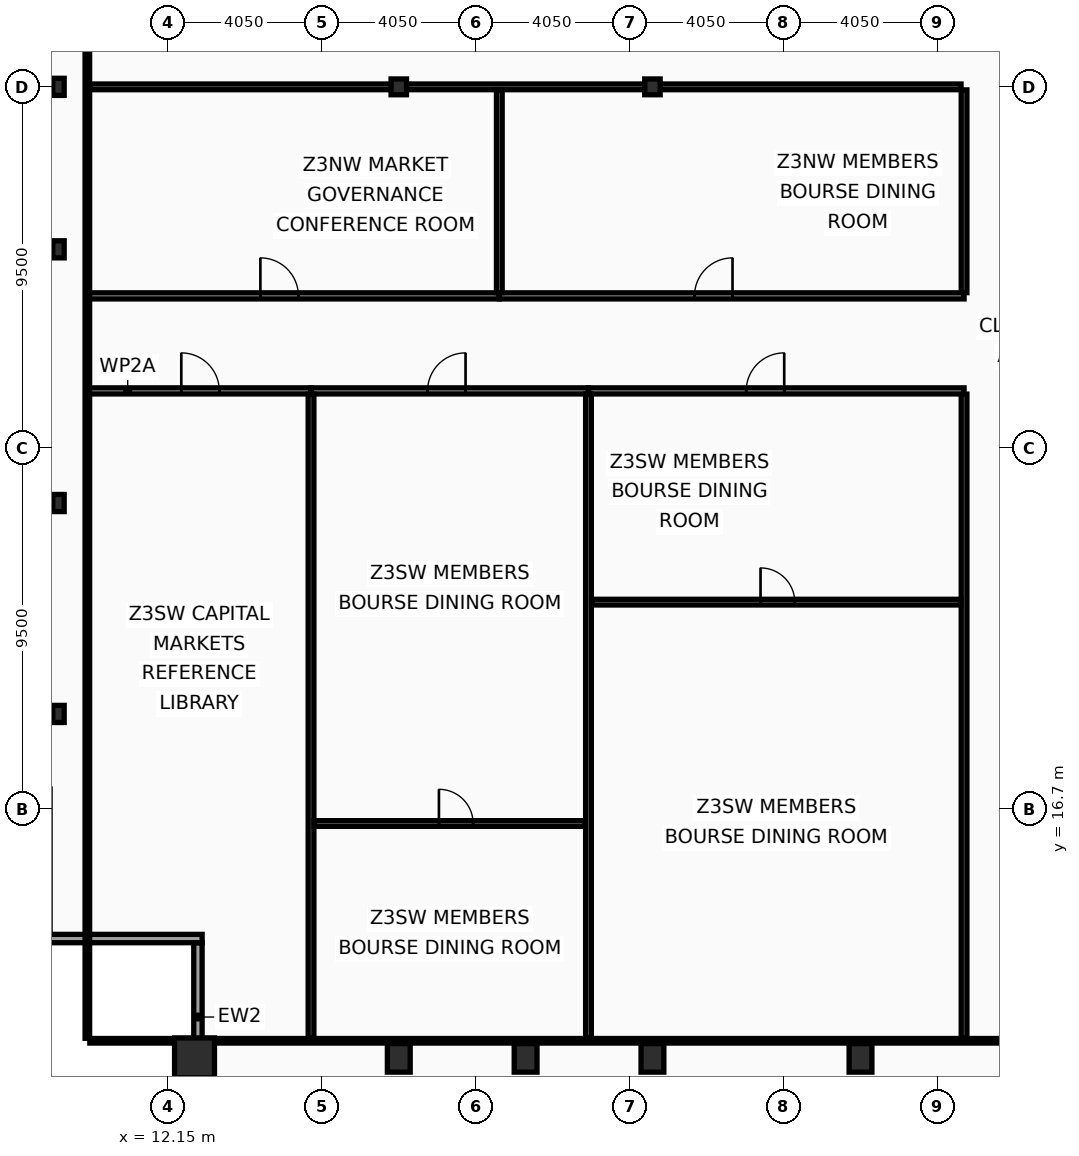
"""IFC4 building model, lengths in metres.
Left out: names, types, materials, properties, quantities, classifications, styles, units other than length and angle.
Written with IfcOpenShell. Run it as: python <this file> out.ifc"""

import sys

from ifc_helpers import new_model, si_unit, direction, frame, frame_2d, origin, origin_2d, place, context, subcontext, project, spatial, rectangle, hollow_rectangle, i_section, extrude, element, fill, save


model = new_model("IFC4")
c1 = context("Model", 3, precision=1e-05, world=origin(), true_north=direction((0.0, 1.0)))
c2 = subcontext(c1, "Body", "Model", "MODEL_VIEW")
j1 = project(units=[si_unit("LENGTHUNIT", "METRE"), si_unit("PLANEANGLEUNIT", "RADIAN")], contexts=[c1])
p1 = place(None, origin())
s1 = spatial("IfcSite", under=j1, at=p1, CompositionType="ELEMENT")
p2 = place(p1, origin())
s2 = spatial("IfcBuilding", under=s1, at=p2, CompositionType="ELEMENT")
p3 = place(p2, frame((0.0, 0.0, 246.2)))
s3 = spatial("IfcBuildingStorey", under=s2, at=p3, CompositionType="ELEMENT", Elevation=246.2)
p4 = place(p3, frame((12.85, 10.15, 0.0), z_axis=(0.0, 0.0, 1.0), x_axis=(1.0, 0.0, 0.0)))
e1 = element("IfcColumn", 1, at=p4, inside=s3, PredefinedType="COLUMN", context=c2, shape_type="SweptSolid", body=[
    extrude(hollow_rectangle(XDim=1.05, YDim=1.05, WallThickness=0.055, at=origin_2d()), origin(), (0.0, 0.0, 1.0), 3.6),
])
for number, where, z_axis, x_axis in (
    (2, (18.225, 10.15, 0.0), (0.0, 0.0, 1.0), (1.0, 0.0, 0.0)),
    (3, (21.562, 10.15, 0.0), (0.0, 0.0, 1.0), (1.0, 0.0, 0.0)),
    (4, (24.9, 10.15, 0.0), (0.0, 0.0, 1.0), (1.0, 0.0, 0.0)),
    (5, (30.375, 10.15, 0.0), (0.0, 0.0, 1.0), (1.0, 0.0, 0.0)),
):
    element("IfcColumn", number, at=place(p3, frame(where, z_axis=z_axis, x_axis=x_axis)), inside=s3, PredefinedType="COLUMN", context=c2, shape_type="SweptSolid", body=[
        extrude(hollow_rectangle(XDim=0.6, YDim=0.75, WallThickness=0.045, at=origin_2d()), origin(), (0.0, 0.0, 1.0), 3.6),
    ])
for number, where, z_axis, x_axis in (
    (6, (9.27, 19.2, 0.0), (0.0, 0.0, 1.0), (1.0, 0.0, 0.0)),
    (7, (9.27, 24.75, 0.0), (0.0, 0.0, 1.0), (1.0, 0.0, 0.0)),
    (8, (9.27, 31.425, 0.0), (0.0, 0.0, 1.0), (1.0, 0.0, 0.0)),
    (9, (9.27, 35.7, 0.0), (0.0, 0.0, 1.0), (1.0, 0.0, 0.0)),
):
    element("IfcColumn", number, at=place(p3, frame(where, z_axis=z_axis, x_axis=x_axis)), inside=s3, PredefinedType="COLUMN", context=c2, shape_type="SweptSolid", body=[
        extrude(i_section(OverallWidth=0.3, OverallDepth=0.45, WebThickness=0.014, FlangeThickness=0.026, at=origin_2d()), origin(), (0.0, 0.0, 1.0), 3.6),
    ])
for number, where, z_axis, x_axis in (
    (10, (18.225, 35.7, 0.0), (0.0, 0.0, 1.0), (1.0, 0.0, 0.0)),
    (11, (24.9, 35.7, 0.0), (0.0, 0.0, 1.0), (1.0, 0.0, 0.0)),
):
    element("IfcColumn", number, at=place(p3, frame(where, z_axis=z_axis, x_axis=x_axis)), inside=s3, PredefinedType="COLUMN", context=c2, shape_type="SweptSolid", body=[
        extrude(i_section(OverallWidth=0.406, OverallDepth=0.416, WebThickness=0.03, FlangeThickness=0.048, at=origin_2d()), origin(), (0.0, 0.0, 1.0), 3.6),
    ])
p5 = place(p3, frame((12.94, 9.27, 0.0), z_axis=(0.0, 0.0, 1.0), x_axis=(0.0, 1.0, 0.0)))
e12 = element("IfcWall", 12, at=p5, inside=s3, PredefinedType="SOLIDWALL", context=c2, shape_type="SweptSolid", body=[
    extrude(rectangle(XDim=3.91, YDim=0.22, at=frame_2d((1.955, 0.0))), origin(), (0.0, 0.0, 1.0), 2.83),
])
p6 = place(p3, frame((13.05, 13.29, 0.0), z_axis=(0.0, 0.0, 1.0), x_axis=(-1.0, 0.0, 0.0)))
e13 = element("IfcWall", 13, at=p6, inside=s3, PredefinedType="SOLIDWALL", context=c2, shape_type="SweptSolid", body=[
    extrude(rectangle(XDim=4.22, YDim=0.22, at=frame_2d((2.11, 0.0))), origin(), (0.0, 0.0, 1.0), 2.83),
])
p7 = place(p3, frame((33.1, 10.665, 0.0), z_axis=(0.0, 0.0, 1.0), x_axis=(0.0, 1.0, 0.0)))
e14 = element("IfcWall", 14, at=p7, inside=s3, PredefinedType="PARTITIONING", context=c2, shape_type="SweptSolid", body=[
    extrude(rectangle(XDim=16.95, YDim=0.15, at=frame_2d((8.475, 0.0))), origin(), (0.0, 0.0, 1.0), 2.98),
])
p8 = place(p3, frame((33.1, 30.285, 0.0), z_axis=(0.0, 0.0, 1.0), x_axis=(0.0, 1.0, 0.0)))
e15 = element("IfcWall", 15, at=p8, inside=s3, PredefinedType="PARTITIONING", context=c2, shape_type="SweptSolid", body=[
    extrude(rectangle(XDim=5.335, YDim=0.15, at=frame_2d((2.667, 0.0))), origin(), (0.0, 0.0, 1.0), 2.98),
])
p9 = place(p3, frame((10.095, 35.7, 0.0), z_axis=(0.0, 0.0, 1.0), x_axis=(1.0, 0.0, 0.0)))
e16 = element("IfcWall", 16, at=p9, inside=s3, PredefinedType="PARTITIONING", context=c2, shape_type="SweptSolid", body=[
    extrude(rectangle(XDim=22.925, YDim=0.15, at=frame_2d((11.462, 0.0))), origin(), (0.0, 0.0, 1.0), 2.78),
])
p10 = place(p3, frame((10.03, 27.7, 0.0), z_axis=(0.0, 0.0, 1.0), x_axis=(1.0, 0.0, 0.0)))
e17 = element("IfcWall", 17, at=p10, inside=s3, PredefinedType="PARTITIONING", context=c2, shape_type="SweptSolid", body=[
    extrude(rectangle(XDim=5.886, YDim=0.16, at=frame_2d((2.943, 0.0))), origin(), (0.0, 0.0, 1.0), 3.44),
])
p11 = place(p10, frame((2.472, 0.0, 0.0)))
e18 = element("IfcOpeningElement", 18, at=p11, cuts=e17, PredefinedType="OPENING", context=c2, shape_type="SweptSolid", body=[
    extrude(rectangle(XDim=1.0, YDim=2.05, at=frame_2d((0.5, 1.025))), frame((0.0, 0.09, 0.0), z_axis=(0.0, -1.0, 0.0), x_axis=(1.0, 0.0, 0.0)), (0.0, 0.0, 1.0), 0.18),
])
p12 = place(p3, frame((15.916, 27.7, 0.0), z_axis=(0.0, 0.0, 1.0), x_axis=(1.0, 0.0, 0.0)))
e19 = element("IfcWall", 19, at=p12, inside=s3, PredefinedType="PARTITIONING", context=c2, shape_type="SweptSolid", body=[
    extrude(rectangle(XDim=7.301, YDim=0.16, at=frame_2d((3.65, 0.0))), origin(), (0.0, 0.0, 1.0), 2.78),
])
p13 = place(p12, frame((3.066, 0.0, 0.0)))
e20 = element("IfcOpeningElement", 20, at=p13, cuts=e19, PredefinedType="OPENING", context=c2, shape_type="SweptSolid", body=[
    extrude(rectangle(XDim=1.0, YDim=2.05, at=frame_2d((0.5, 1.025))), frame((0.0, 0.09, 0.0), z_axis=(0.0, -1.0, 0.0), x_axis=(1.0, 0.0, 0.0)), (0.0, 0.0, 1.0), 0.18),
])
p14 = place(p3, frame((15.916, 10.665, 0.0), z_axis=(0.0, 0.0, 1.0), x_axis=(0.0, 1.0, 0.0)))
e21 = element("IfcWall", 21, at=p14, inside=s3, PredefinedType="PARTITIONING", context=c2, shape_type="SweptSolid", body=[
    extrude(rectangle(XDim=16.95, YDim=0.15, at=frame_2d((8.475, 0.0))), origin(), (0.0, 0.0, 1.0), 2.78),
])
p15 = place(p3, frame((15.996, 16.317, 0.0), z_axis=(0.0, 0.0, 1.0), x_axis=(1.0, 0.0, 0.0)))
e22 = element("IfcWall", 22, at=p15, inside=s3, PredefinedType="PARTITIONING", context=c2, shape_type="SweptSolid", body=[
    extrude(rectangle(XDim=7.141, YDim=0.15, at=frame_2d((3.57, 0.0))), origin(), (0.0, 0.0, 1.0), 2.78),
])
p16 = place(p15, frame((3.285, 0.0, 0.0)))
e23 = element("IfcOpeningElement", 23, at=p16, cuts=e22, PredefinedType="OPENING", context=c2, shape_type="SweptSolid", body=[
    extrude(rectangle(XDim=0.9, YDim=2.05, at=frame_2d((0.45, 1.025))), frame((0.0, 0.085, 0.0), z_axis=(0.0, -1.0, 0.0), x_axis=(1.0, 0.0, 0.0)), (0.0, 0.0, 1.0), 0.17),
])
p17 = place(p3, frame((23.217, 27.7, 0.0), z_axis=(0.0, 0.0, 1.0), x_axis=(1.0, 0.0, 0.0)))
e24 = element("IfcWall", 24, at=p17, inside=s3, PredefinedType="PARTITIONING", context=c2, shape_type="SweptSolid", body=[
    extrude(rectangle(XDim=9.883, YDim=0.16, at=frame_2d((4.942, 0.0))), origin(), (0.0, 0.0, 1.0), 2.78),
])
p18 = place(p17, frame((4.151, 0.0, 0.0)))
e25 = element("IfcOpeningElement", 25, at=p18, cuts=e24, PredefinedType="OPENING", context=c2, shape_type="SweptSolid", body=[
    extrude(rectangle(XDim=1.0, YDim=2.05, at=frame_2d((0.5, 1.025))), frame((0.0, 0.09, 0.0), z_axis=(0.0, -1.0, 0.0), x_axis=(1.0, 0.0, 0.0)), (0.0, 0.0, 1.0), 0.18),
])
p19 = place(p3, frame((23.217, 10.665, 0.0), z_axis=(0.0, 0.0, 1.0), x_axis=(0.0, 1.0, 0.0)))
e26 = element("IfcWall", 26, at=p19, inside=s3, PredefinedType="PARTITIONING", context=c2, shape_type="SweptSolid", body=[
    extrude(rectangle(XDim=16.95, YDim=0.15, at=frame_2d((8.475, 0.0))), origin(), (0.0, 0.0, 1.0), 2.98),
])
p20 = place(p3, frame((23.297, 22.142, 0.0), z_axis=(0.0, 0.0, 1.0), x_axis=(1.0, 0.0, 0.0)))
e27 = element("IfcWall", 27, at=p20, inside=s3, PredefinedType="PARTITIONING", context=c2, shape_type="SweptSolid", body=[
    extrude(rectangle(XDim=9.723, YDim=0.15, at=frame_2d((4.862, 0.0))), origin(), (0.0, 0.0, 1.0), 2.78),
])
p21 = place(p20, frame((4.448, 0.0, 0.0)))
e28 = element("IfcOpeningElement", 28, at=p21, cuts=e27, PredefinedType="OPENING", context=c2, shape_type="SweptSolid", body=[
    extrude(rectangle(XDim=0.9, YDim=2.05, at=frame_2d((0.45, 1.025))), frame((0.0, 0.085, 0.0), z_axis=(0.0, -1.0, 0.0), x_axis=(1.0, 0.0, 0.0)), (0.0, 0.0, 1.0), 0.17),
])
p22 = place(p3, frame((10.03, 30.2, 0.0), z_axis=(0.0, 0.0, 1.0), x_axis=(1.0, 0.0, 0.0)))
e29 = element("IfcWall", 29, at=p22, inside=s3, PredefinedType="PARTITIONING", context=c2, shape_type="SweptSolid", body=[
    extrude(rectangle(XDim=10.841, YDim=0.16, at=frame_2d((5.42, 0.0))), origin(), (0.0, 0.0, 1.0), 2.78),
])
p23 = place(p22, frame((4.553, 0.0, 0.0)))
e30 = element("IfcOpeningElement", 30, at=p23, cuts=e29, PredefinedType="OPENING", context=c2, shape_type="SweptSolid", body=[
    extrude(rectangle(XDim=1.0, YDim=2.05, at=frame_2d((0.5, 1.025))), frame((0.0, 0.09, 0.0), z_axis=(0.0, -1.0, 0.0), x_axis=(1.0, 0.0, 0.0)), (0.0, 0.0, 1.0), 0.18),
])
p24 = place(p3, frame((20.871, 30.2, 0.0), z_axis=(0.0, 0.0, 1.0), x_axis=(1.0, 0.0, 0.0)))
e31 = element("IfcWall", 31, at=p24, inside=s3, PredefinedType="PARTITIONING", context=c2, shape_type="SweptSolid", body=[
    extrude(rectangle(XDim=12.229, YDim=0.16, at=frame_2d((6.115, 0.0))), origin(), (0.0, 0.0, 1.0), 2.78),
])
p25 = place(p24, frame((5.136, 0.0, 0.0)))
e32 = element("IfcOpeningElement", 32, at=p25, cuts=e31, PredefinedType="OPENING", context=c2, shape_type="SweptSolid", body=[
    extrude(rectangle(XDim=1.0, YDim=2.05, at=frame_2d((0.5, 1.025))), frame((0.0, 0.09, 0.0), z_axis=(0.0, -1.0, 0.0), x_axis=(1.0, 0.0, 0.0)), (0.0, 0.0, 1.0), 0.18),
])
p26 = place(p3, frame((20.871, 30.285, 0.0), z_axis=(0.0, 0.0, 1.0), x_axis=(0.0, 1.0, 0.0)))
e33 = element("IfcWall", 33, at=p26, inside=s3, PredefinedType="PARTITIONING", context=c2, shape_type="SweptSolid", body=[
    extrude(rectangle(XDim=5.335, YDim=0.15, at=frame_2d((2.667, 0.0))), origin(), (0.0, 0.0, 1.0), 2.98),
])
p27 = place(p3, frame((10.03, 10.665, 0.0), z_axis=(0.0, 0.0, 1.0), x_axis=(0.0, 1.0, 0.0)))
e34 = element("IfcWall", 34, at=p27, inside=s3, PredefinedType="PARTITIONING", context=c2, shape_type="SweptSolid", body=[
    extrude(rectangle(XDim=42.11, YDim=0.12, at=frame_2d((21.055, 0.0))), origin(), (0.0, 0.0, 1.0), 2.78),
])
p28 = place(p3, frame((10.095, 10.6, 0.0), z_axis=(0.0, 0.0, 1.0), x_axis=(1.0, 0.0, 0.0)))
e35 = element("IfcWall", 35, at=p28, inside=s3, PredefinedType="PARTITIONING", context=c2, shape_type="SweptSolid", body=[
    extrude(rectangle(XDim=52.71, YDim=0.12, at=frame_2d((26.355, 0.0))), origin(), (0.0, 0.0, 1.0), 2.78),
])
p29 = place(p11, origin())
e36 = element("IfcDoor", 36, at=p29, inside=s3, OperationType="SINGLE_SWING_LEFT", PredefinedType="DOOR", context=c2, shape_type="SweptSolid", body=[
    extrude(rectangle(XDim=1.0, YDim=2.05, at=frame_2d((0.5, 1.025))), frame((0.0, 0.025, 0.0), z_axis=(0.0, -1.0, 0.0), x_axis=(1.0, 0.0, 0.0)), (0.0, 0.0, 1.0), 0.05),
])
fill(e18, e36)
p30 = place(p13, origin())
e37 = element("IfcDoor", 37, at=p30, inside=s3, OperationType="SINGLE_SWING_RIGHT", PredefinedType="DOOR", context=c2, shape_type="SweptSolid", body=[
    extrude(rectangle(XDim=1.0, YDim=2.05, at=frame_2d((0.5, 1.025))), frame((0.0, 0.025, 0.0), z_axis=(0.0, -1.0, 0.0), x_axis=(1.0, 0.0, 0.0)), (0.0, 0.0, 1.0), 0.05),
])
fill(e20, e37)
p31 = place(p16, origin())
e38 = element("IfcDoor", 38, at=p31, inside=s3, OperationType="SINGLE_SWING_LEFT", PredefinedType="DOOR", context=c2, shape_type="SweptSolid", body=[
    extrude(rectangle(XDim=0.9, YDim=2.05, at=frame_2d((0.45, 1.025))), frame((0.0, 0.025, 0.0), z_axis=(0.0, -1.0, 0.0), x_axis=(1.0, 0.0, 0.0)), (0.0, 0.0, 1.0), 0.05),
])
fill(e23, e38)
p32 = place(p18, origin())
e39 = element("IfcDoor", 39, at=p32, inside=s3, OperationType="SINGLE_SWING_RIGHT", PredefinedType="DOOR", context=c2, shape_type="SweptSolid", body=[
    extrude(rectangle(XDim=1.0, YDim=2.05, at=frame_2d((0.5, 1.025))), frame((0.0, 0.025, 0.0), z_axis=(0.0, -1.0, 0.0), x_axis=(1.0, 0.0, 0.0)), (0.0, 0.0, 1.0), 0.05),
])
fill(e25, e39)
p33 = place(p21, origin())
e40 = element("IfcDoor", 40, at=p33, inside=s3, OperationType="SINGLE_SWING_LEFT", PredefinedType="DOOR", context=c2, shape_type="SweptSolid", body=[
    extrude(rectangle(XDim=0.9, YDim=2.05, at=frame_2d((0.45, 1.025))), frame((0.0, 0.025, 0.0), z_axis=(0.0, -1.0, 0.0), x_axis=(1.0, 0.0, 0.0)), (0.0, 0.0, 1.0), 0.05),
])
fill(e28, e40)
p34 = place(p23, origin())
e41 = element("IfcDoor", 41, at=p34, inside=s3, OperationType="SINGLE_SWING_LEFT", PredefinedType="DOOR", context=c2, shape_type="SweptSolid", body=[
    extrude(rectangle(XDim=1.0, YDim=2.05, at=frame_2d((0.5, 1.025))), frame((0.0, 0.025, 0.0), z_axis=(0.0, -1.0, 0.0), x_axis=(1.0, 0.0, 0.0)), (0.0, 0.0, 1.0), 0.05),
])
fill(e30, e41)
p35 = place(p25, origin())
e42 = element("IfcDoor", 42, at=p35, inside=s3, OperationType="SINGLE_SWING_RIGHT", PredefinedType="DOOR", context=c2, shape_type="SweptSolid", body=[
    extrude(rectangle(XDim=1.0, YDim=2.05, at=frame_2d((0.5, 1.025))), frame((0.0, 0.025, 0.0), z_axis=(0.0, -1.0, 0.0), x_axis=(1.0, 0.0, 0.0)), (0.0, 0.0, 1.0), 0.05),
])
fill(e32, e42)
save(model, sys.argv[1])
